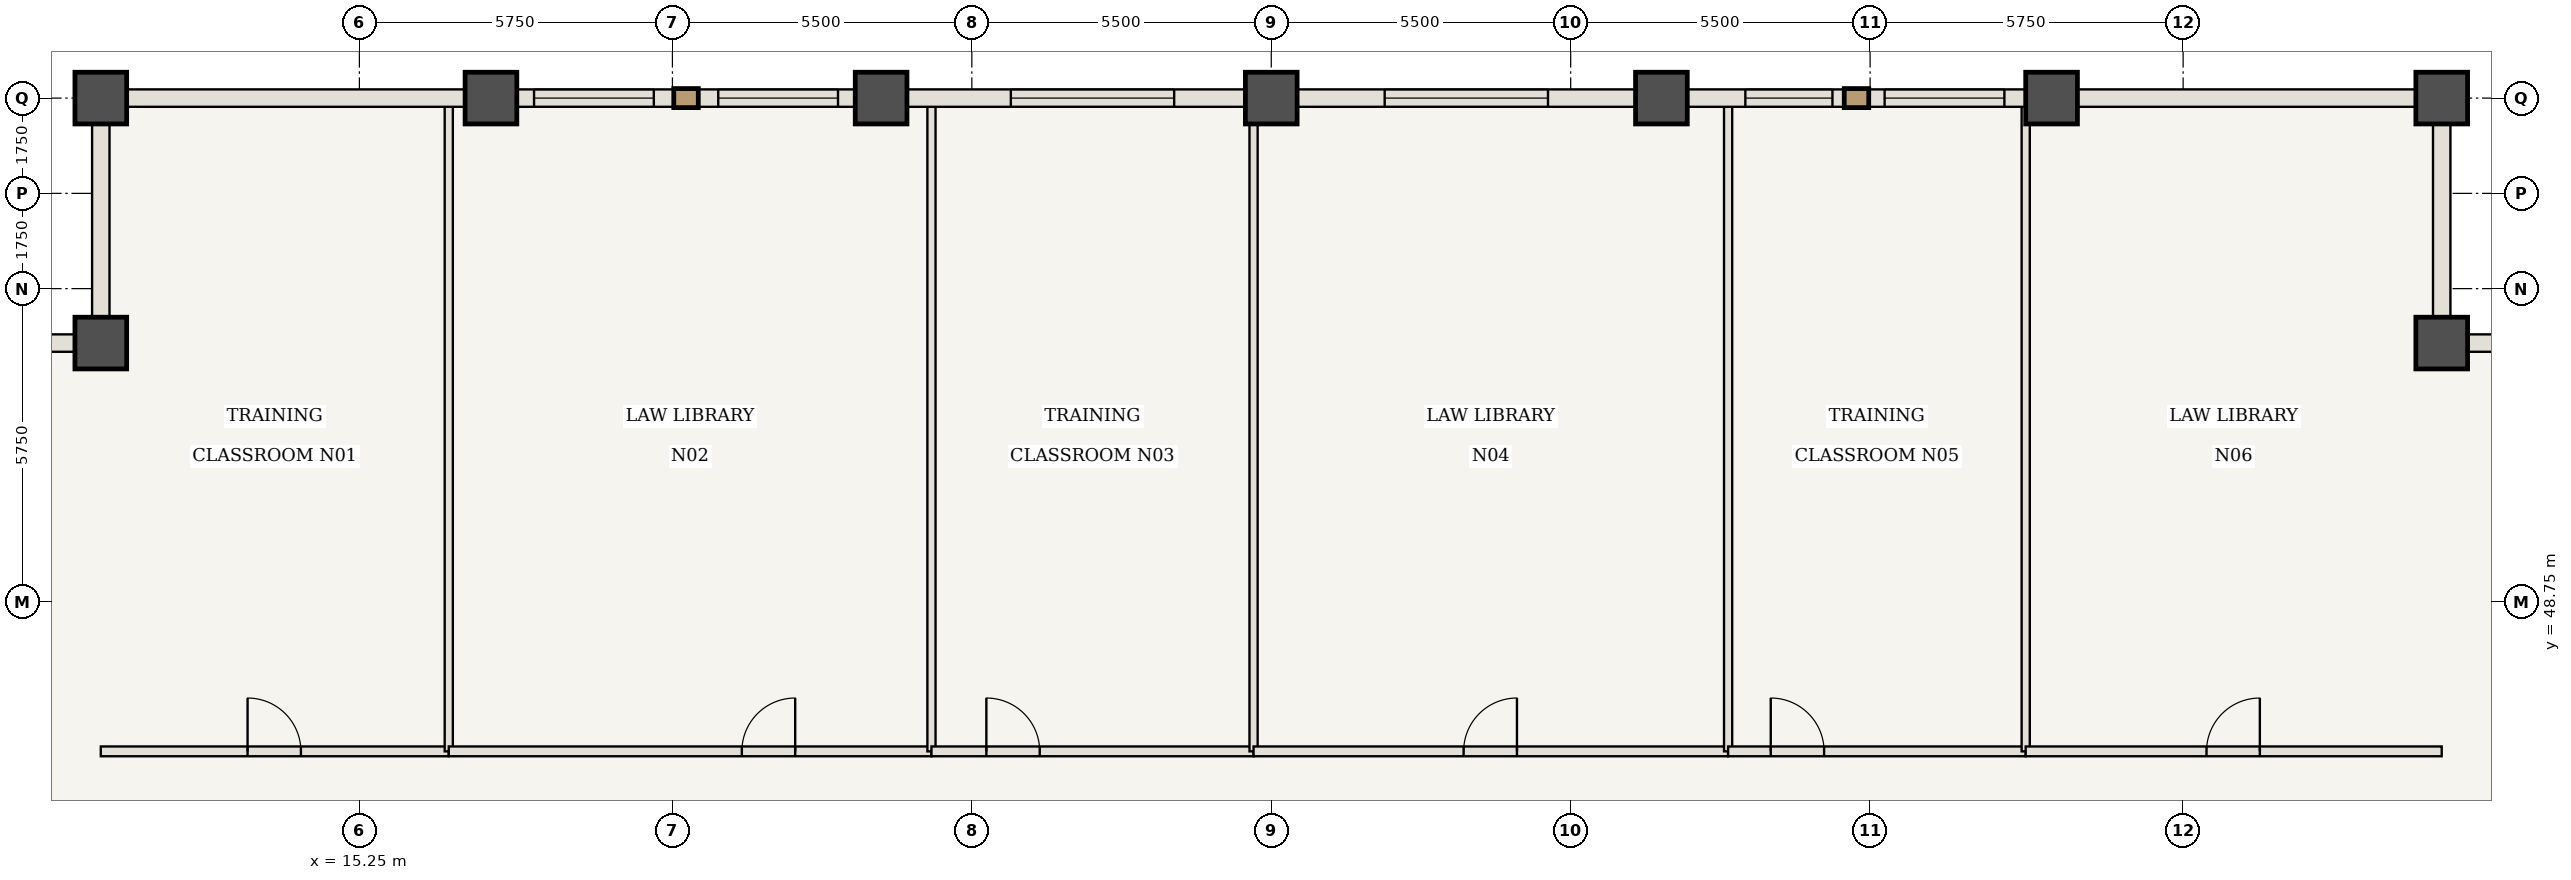
"""IFC4 building model, lengths in metres.
Left out: names, types, materials, properties, quantities, classifications, styles, units other than length and angle.
Written with IfcOpenShell. Run it as: python <this file> out.ifc"""

import sys

from ifc_helpers import new_model, si_unit, direction, frame, frame_2d, origin, origin_2d, place, context, subcontext, project, spatial, rectangle, extrude, element, fill, save


model = new_model("IFC4")
c1 = context("Model", 3, precision=1e-05, world=origin(), true_north=direction((0.0, 1.0)))
c2 = subcontext(c1, "Body", "Model", "MODEL_VIEW")
j1 = project(units=[si_unit("LENGTHUNIT", "METRE"), si_unit("PLANEANGLEUNIT", "RADIAN")], contexts=[c1])
p1 = place(None, origin())
s1 = spatial("IfcSite", under=j1, at=p1, CompositionType="ELEMENT")
p2 = place(p1, origin())
s2 = spatial("IfcBuilding", under=s1, at=p2, CompositionType="ELEMENT")
p3 = place(p2, frame((0.0, 0.0, 129.85)))
s3 = spatial("IfcBuildingStorey", under=s2, at=p3, CompositionType="ELEMENT", Elevation=129.85)
for number, where, z_axis, x_axis in (
    (1, (53.5, 53.5, 0.0), (0.0, 0.0, 1.0), (1.0, 0.0, 0.0)),
    (2, (53.5, 58.0, 0.0), (0.0, 0.0, 1.0), (1.0, 0.0, 0.0)),
    (3, (10.5, 58.0, 0.0), (0.0, 0.0, 1.0), (1.0, 0.0, 0.0)),
    (4, (10.5, 53.5, 0.0), (0.0, 0.0, 1.0), (1.0, 0.0, 0.0)),
    (5, (17.667, 58.0, 0.0), (0.0, 0.0, 1.0), (1.0, 0.0, 0.0)),
    (6, (24.833, 58.0, 0.0), (0.0, 0.0, 1.0), (1.0, 0.0, 0.0)),
    (7, (32.0, 58.0, 0.0), (0.0, 0.0, 1.0), (1.0, 0.0, 0.0)),
    (8, (39.167, 58.0, 0.0), (0.0, 0.0, 1.0), (1.0, 0.0, 0.0)),
    (9, (46.333, 58.0, 0.0), (0.0, 0.0, 1.0), (1.0, 0.0, 0.0)),
):
    element("IfcColumn", number, at=place(p3, frame(where, z_axis=z_axis, x_axis=x_axis)), inside=s3, PredefinedType="COLUMN", context=c2, shape_type="SweptSolid", body=[
        extrude(rectangle(XDim=0.95, YDim=0.95, at=origin_2d()), origin(), (0.0, 0.0, 1.0), 3.85),
    ])
p4 = place(p3, frame((10.5, 46.0, 0.0), z_axis=(0.0, 0.0, 1.0), x_axis=(1.0, 0.0, 0.0)))
e10 = element("IfcWall", 10, at=p4, inside=s3, PredefinedType="STANDARD", context=c2, shape_type="SweptSolid", body=[
    extrude(rectangle(XDim=6.392, YDim=0.18, at=frame_2d((3.196, 0.0))), origin(), (0.0, 0.0, 1.0), 3.685),
])
p5 = place(p4, frame((2.696, 0.0, 0.0)))
e11 = element("IfcOpeningElement", 11, at=p5, cuts=e10, PredefinedType="OPENING", context=c2, shape_type="SweptSolid", body=[
    extrude(rectangle(XDim=0.98, YDim=2.2, at=frame_2d((0.49, 1.1))), frame((0.0, 0.1, 0.0), z_axis=(0.0, -1.0, 0.0), x_axis=(1.0, 0.0, 0.0)), (0.0, 0.0, 1.0), 0.2),
])
p6 = place(p3, frame((16.892, 46.0, 0.0), z_axis=(0.0, 0.0, 1.0), x_axis=(0.0, 1.0, 0.0)))
e12 = element("IfcWall", 12, at=p6, inside=s3, PredefinedType="STANDARD", context=c2, shape_type="SweptSolid", body=[
    extrude(rectangle(XDim=11.94, YDim=0.15, at=frame_2d((5.97, 0.0))), origin(), (0.0, 0.0, 1.0), 3.685),
])
p7 = place(p3, frame((16.892, 46.0, 0.0), z_axis=(0.0, 0.0, 1.0), x_axis=(1.0, 0.0, 0.0)))
e13 = element("IfcWall", 13, at=p7, inside=s3, PredefinedType="STANDARD", context=c2, shape_type="SweptSolid", body=[
    extrude(rectangle(XDim=8.867, YDim=0.18, at=frame_2d((4.433, 0.0))), origin(), (0.0, 0.0, 1.0), 3.685),
])
p8 = place(p7, frame((5.383, 0.0, 0.0)))
e14 = element("IfcOpeningElement", 14, at=p8, cuts=e13, PredefinedType="OPENING", context=c2, shape_type="SweptSolid", body=[
    extrude(rectangle(XDim=0.98, YDim=2.2, at=frame_2d((0.49, 1.1))), frame((0.0, 0.1, 0.0), z_axis=(0.0, -1.0, 0.0), x_axis=(1.0, 0.0, 0.0)), (0.0, 0.0, 1.0), 0.2),
])
p9 = place(p3, frame((25.758, 46.0, 0.0), z_axis=(0.0, 0.0, 1.0), x_axis=(0.0, 1.0, 0.0)))
e15 = element("IfcWall", 15, at=p9, inside=s3, PredefinedType="STANDARD", context=c2, shape_type="SweptSolid", body=[
    extrude(rectangle(XDim=11.94, YDim=0.15, at=frame_2d((5.97, 0.0))), origin(), (0.0, 0.0, 1.0), 3.685),
])
p10 = place(p3, frame((25.758, 46.0, 0.0), z_axis=(0.0, 0.0, 1.0), x_axis=(1.0, 0.0, 0.0)))
e16 = element("IfcWall", 16, at=p10, inside=s3, PredefinedType="STANDARD", context=c2, shape_type="SweptSolid", body=[
    extrude(rectangle(XDim=5.917, YDim=0.18, at=frame_2d((2.958, 0.0))), origin(), (0.0, 0.0, 1.0), 3.685),
])
p11 = place(p10, frame((1.008, 0.0, 0.0)))
e17 = element("IfcOpeningElement", 17, at=p11, cuts=e16, PredefinedType="OPENING", context=c2, shape_type="SweptSolid", body=[
    extrude(rectangle(XDim=0.98, YDim=2.2, at=frame_2d((0.49, 1.1))), frame((0.0, 0.1, 0.0), z_axis=(0.0, -1.0, 0.0), x_axis=(1.0, 0.0, 0.0)), (0.0, 0.0, 1.0), 0.2),
])
p12 = place(p3, frame((31.675, 46.0, 0.0), z_axis=(0.0, 0.0, 1.0), x_axis=(0.0, 1.0, 0.0)))
e18 = element("IfcWall", 18, at=p12, inside=s3, PredefinedType="STANDARD", context=c2, shape_type="SweptSolid", body=[
    extrude(rectangle(XDim=11.94, YDim=0.15, at=frame_2d((5.97, 0.0))), origin(), (0.0, 0.0, 1.0), 3.685),
])
p13 = place(p3, frame((31.675, 46.0, 0.0), z_axis=(0.0, 0.0, 1.0), x_axis=(1.0, 0.0, 0.0)))
e19 = element("IfcWall", 19, at=p13, inside=s3, PredefinedType="STANDARD", context=c2, shape_type="SweptSolid", body=[
    extrude(rectangle(XDim=8.717, YDim=0.18, at=frame_2d((4.358, 0.0))), origin(), (0.0, 0.0, 1.0), 3.685),
])
p14 = place(p13, frame((3.858, 0.0, 0.0)))
e20 = element("IfcOpeningElement", 20, at=p14, cuts=e19, PredefinedType="OPENING", context=c2, shape_type="SweptSolid", body=[
    extrude(rectangle(XDim=0.98, YDim=2.2, at=frame_2d((0.49, 1.1))), frame((0.0, 0.1, 0.0), z_axis=(0.0, -1.0, 0.0), x_axis=(1.0, 0.0, 0.0)), (0.0, 0.0, 1.0), 0.2),
])
p15 = place(p3, frame((40.392, 46.0, 0.0), z_axis=(0.0, 0.0, 1.0), x_axis=(0.0, 1.0, 0.0)))
e21 = element("IfcWall", 21, at=p15, inside=s3, PredefinedType="STANDARD", context=c2, shape_type="SweptSolid", body=[
    extrude(rectangle(XDim=11.94, YDim=0.15, at=frame_2d((5.97, 0.0))), origin(), (0.0, 0.0, 1.0), 3.685),
])
p16 = place(p3, frame((40.392, 46.0, 0.0), z_axis=(0.0, 0.0, 1.0), x_axis=(1.0, 0.0, 0.0)))
e22 = element("IfcWall", 22, at=p16, inside=s3, PredefinedType="STANDARD", context=c2, shape_type="SweptSolid", body=[
    extrude(rectangle(XDim=5.467, YDim=0.18, at=frame_2d((2.733, 0.0))), origin(), (0.0, 0.0, 1.0), 3.685),
])
p17 = place(p16, frame((0.783, 0.0, 0.0)))
e23 = element("IfcOpeningElement", 23, at=p17, cuts=e22, PredefinedType="OPENING", context=c2, shape_type="SweptSolid", body=[
    extrude(rectangle(XDim=0.98, YDim=2.2, at=frame_2d((0.49, 1.1))), frame((0.0, 0.1, 0.0), z_axis=(0.0, -1.0, 0.0), x_axis=(1.0, 0.0, 0.0)), (0.0, 0.0, 1.0), 0.2),
])
p18 = place(p3, frame((45.858, 46.0, 0.0), z_axis=(0.0, 0.0, 1.0), x_axis=(0.0, 1.0, 0.0)))
e24 = element("IfcWall", 24, at=p18, inside=s3, PredefinedType="STANDARD", context=c2, shape_type="SweptSolid", body=[
    extrude(rectangle(XDim=11.94, YDim=0.15, at=frame_2d((5.97, 0.0))), origin(), (0.0, 0.0, 1.0), 3.685),
])
p19 = place(p3, frame((45.858, 46.0, 0.0), z_axis=(0.0, 0.0, 1.0), x_axis=(1.0, 0.0, 0.0)))
e25 = element("IfcWall", 25, at=p19, inside=s3, PredefinedType="STANDARD", context=c2, shape_type="SweptSolid", body=[
    extrude(rectangle(XDim=7.642, YDim=0.18, at=frame_2d((3.821, 0.0))), origin(), (0.0, 0.0, 1.0), 3.685),
])
p20 = place(p19, frame((3.321, 0.0, 0.0)))
e26 = element("IfcOpeningElement", 26, at=p20, cuts=e25, PredefinedType="OPENING", context=c2, shape_type="SweptSolid", body=[
    extrude(rectangle(XDim=0.98, YDim=2.2, at=frame_2d((0.49, 1.1))), frame((0.0, 0.1, 0.0), z_axis=(0.0, -1.0, 0.0), x_axis=(1.0, 0.0, 0.0)), (0.0, 0.0, 1.0), 0.2),
])
p21 = place(p3, frame((10.5, 58.0, 0.0), z_axis=(0.0, 0.0, 1.0), x_axis=(1.0, 0.0, 0.0)))
e27 = element("IfcWall", 27, at=p21, inside=s3, PredefinedType="USERDEFINED", context=c2, shape_type="SweptSolid", body=[
    extrude(rectangle(XDim=7.167, YDim=0.32, at=frame_2d((3.583, 0.0))), origin(), (0.0, 0.0, 1.0), 2.885),
])
p22 = place(p3, frame((17.667, 58.0, 0.0), z_axis=(0.0, 0.0, 1.0), x_axis=(1.0, 0.0, 0.0)))
e28 = element("IfcWall", 28, at=p22, inside=s3, PredefinedType="USERDEFINED", context=c2, shape_type="SweptSolid", body=[
    extrude(rectangle(XDim=7.167, YDim=0.32, at=frame_2d((3.583, 0.0))), origin(), (0.0, 0.0, 1.0), 2.885),
])
p23 = place(p22, frame((0.792, 0.0, 0.85)))
e29 = element("IfcOpeningElement", 29, at=p23, cuts=e28, PredefinedType="OPENING", context=c2, shape_type="SweptSolid", body=[
    extrude(rectangle(XDim=2.2, YDim=1.835, at=frame_2d((1.1, 0.917))), frame((0.0, 0.17, 0.0), z_axis=(0.0, -1.0, 0.0), x_axis=(1.0, 0.0, 0.0)), (0.0, 0.0, 1.0), 0.34),
])
p24 = place(p22, frame((4.175, 0.0, 0.85)))
e30 = element("IfcOpeningElement", 30, at=p24, cuts=e28, PredefinedType="OPENING", context=c2, shape_type="SweptSolid", body=[
    extrude(rectangle(XDim=2.2, YDim=1.835, at=frame_2d((1.1, 0.917))), frame((0.0, 0.17, 0.0), z_axis=(0.0, -1.0, 0.0), x_axis=(1.0, 0.0, 0.0)), (0.0, 0.0, 1.0), 0.34),
])
p25 = place(p3, frame((24.833, 58.0, 0.0), z_axis=(0.0, 0.0, 1.0), x_axis=(1.0, 0.0, 0.0)))
e31 = element("IfcWall", 31, at=p25, inside=s3, PredefinedType="USERDEFINED", context=c2, shape_type="SweptSolid", body=[
    extrude(rectangle(XDim=7.167, YDim=0.32, at=frame_2d((3.583, 0.0))), origin(), (0.0, 0.0, 1.0), 2.885),
])
p26 = place(p25, frame((2.383, 0.0, 0.85)))
e32 = element("IfcOpeningElement", 32, at=p26, cuts=e31, PredefinedType="OPENING", context=c2, shape_type="SweptSolid", body=[
    extrude(rectangle(XDim=3.0, YDim=1.835, at=frame_2d((1.5, 0.917))), frame((0.0, 0.17, 0.0), z_axis=(0.0, -1.0, 0.0), x_axis=(1.0, 0.0, 0.0)), (0.0, 0.0, 1.0), 0.34),
])
p27 = place(p3, frame((32.0, 58.0, 0.0), z_axis=(0.0, 0.0, 1.0), x_axis=(1.0, 0.0, 0.0)))
e33 = element("IfcWall", 33, at=p27, inside=s3, PredefinedType="USERDEFINED", context=c2, shape_type="SweptSolid", body=[
    extrude(rectangle(XDim=7.167, YDim=0.32, at=frame_2d((3.583, 0.0))), origin(), (0.0, 0.0, 1.0), 2.885),
])
p28 = place(p27, frame((2.083, 0.0, 0.85)))
e34 = element("IfcOpeningElement", 34, at=p28, cuts=e33, PredefinedType="OPENING", context=c2, shape_type="SweptSolid", body=[
    extrude(rectangle(XDim=3.0, YDim=1.835, at=frame_2d((1.5, 0.917))), frame((0.0, 0.17, 0.0), z_axis=(0.0, -1.0, 0.0), x_axis=(1.0, 0.0, 0.0)), (0.0, 0.0, 1.0), 0.34),
])
p29 = place(p3, frame((39.167, 58.0, 0.0), z_axis=(0.0, 0.0, 1.0), x_axis=(1.0, 0.0, 0.0)))
e35 = element("IfcWall", 35, at=p29, inside=s3, PredefinedType="USERDEFINED", context=c2, shape_type="SweptSolid", body=[
    extrude(rectangle(XDim=7.167, YDim=0.32, at=frame_2d((3.583, 0.0))), origin(), (0.0, 0.0, 1.0), 2.885),
])
p30 = place(p29, frame((1.542, 0.0, 0.85)))
e36 = element("IfcOpeningElement", 36, at=p30, cuts=e35, PredefinedType="OPENING", context=c2, shape_type="SweptSolid", body=[
    extrude(rectangle(XDim=1.6, YDim=1.835, at=frame_2d((0.8, 0.917))), frame((0.0, 0.17, 0.0), z_axis=(0.0, -1.0, 0.0), x_axis=(1.0, 0.0, 0.0)), (0.0, 0.0, 1.0), 0.34),
])
p31 = place(p29, frame((4.1, 0.0, 0.85)))
e37 = element("IfcOpeningElement", 37, at=p31, cuts=e35, PredefinedType="OPENING", context=c2, shape_type="SweptSolid", body=[
    extrude(rectangle(XDim=2.2, YDim=1.835, at=frame_2d((1.1, 0.917))), frame((0.0, 0.17, 0.0), z_axis=(0.0, -1.0, 0.0), x_axis=(1.0, 0.0, 0.0)), (0.0, 0.0, 1.0), 0.34),
])
p32 = place(p3, frame((46.333, 58.0, 0.0), z_axis=(0.0, 0.0, 1.0), x_axis=(1.0, 0.0, 0.0)))
e38 = element("IfcWall", 38, at=p32, inside=s3, PredefinedType="USERDEFINED", context=c2, shape_type="SweptSolid", body=[
    extrude(rectangle(XDim=7.167, YDim=0.32, at=frame_2d((3.583, 0.0))), origin(), (0.0, 0.0, 1.0), 2.885),
])
for number, where, z_axis, x_axis in (
    (39, (53.5, 53.5, 0.0), (0.0, 0.0, 1.0), (1.0, 0.0, 0.0)),
    (40, (53.5, 58.0, 0.0), (0.0, 0.0, 1.0), (0.0, -1.0, 0.0)),
    (41, (10.5, 53.5, 0.0), (0.0, 0.0, 1.0), (0.0, 1.0, 0.0)),
    (42, (6.0, 53.5, 0.0), (0.0, 0.0, 1.0), (1.0, 0.0, 0.0)),
):
    element("IfcWall", number, at=place(p3, frame(where, z_axis=z_axis, x_axis=x_axis)), inside=s3, PredefinedType="USERDEFINED", context=c2, shape_type="SweptSolid", body=[
        extrude(rectangle(XDim=4.5, YDim=0.32, at=frame_2d((2.25, 0.0))), origin(), (0.0, 0.0, 1.0), 2.885),
    ])
p33 = place(p5, origin())
e43 = element("IfcDoor", 43, at=p33, inside=s3, OperationType="SINGLE_SWING_LEFT", PredefinedType="DOOR", context=c2, shape_type="SweptSolid", body=[
    extrude(rectangle(XDim=0.98, YDim=2.2, at=frame_2d((0.49, 1.1))), frame((0.0, 0.025, 0.0), z_axis=(0.0, -1.0, 0.0), x_axis=(1.0, 0.0, 0.0)), (0.0, 0.0, 1.0), 0.05),
])
fill(e11, e43)
p34 = place(p8, origin())
e44 = element("IfcDoor", 44, at=p34, inside=s3, OperationType="SINGLE_SWING_RIGHT", PredefinedType="DOOR", context=c2, shape_type="SweptSolid", body=[
    extrude(rectangle(XDim=0.98, YDim=2.2, at=frame_2d((0.49, 1.1))), frame((0.0, 0.025, 0.0), z_axis=(0.0, -1.0, 0.0), x_axis=(1.0, 0.0, 0.0)), (0.0, 0.0, 1.0), 0.05),
])
fill(e14, e44)
p35 = place(p11, origin())
e45 = element("IfcDoor", 45, at=p35, inside=s3, OperationType="SINGLE_SWING_LEFT", PredefinedType="DOOR", context=c2, shape_type="SweptSolid", body=[
    extrude(rectangle(XDim=0.98, YDim=2.2, at=frame_2d((0.49, 1.1))), frame((0.0, 0.025, 0.0), z_axis=(0.0, -1.0, 0.0), x_axis=(1.0, 0.0, 0.0)), (0.0, 0.0, 1.0), 0.05),
])
fill(e17, e45)
p36 = place(p14, origin())
e46 = element("IfcDoor", 46, at=p36, inside=s3, OperationType="SINGLE_SWING_RIGHT", PredefinedType="DOOR", context=c2, shape_type="SweptSolid", body=[
    extrude(rectangle(XDim=0.98, YDim=2.2, at=frame_2d((0.49, 1.1))), frame((0.0, 0.025, 0.0), z_axis=(0.0, -1.0, 0.0), x_axis=(1.0, 0.0, 0.0)), (0.0, 0.0, 1.0), 0.05),
])
fill(e20, e46)
p37 = place(p17, origin())
e47 = element("IfcDoor", 47, at=p37, inside=s3, OperationType="SINGLE_SWING_LEFT", PredefinedType="DOOR", context=c2, shape_type="SweptSolid", body=[
    extrude(rectangle(XDim=0.98, YDim=2.2, at=frame_2d((0.49, 1.1))), frame((0.0, 0.025, 0.0), z_axis=(0.0, -1.0, 0.0), x_axis=(1.0, 0.0, 0.0)), (0.0, 0.0, 1.0), 0.05),
])
fill(e23, e47)
p38 = place(p20, origin())
e48 = element("IfcDoor", 48, at=p38, inside=s3, OperationType="SINGLE_SWING_RIGHT", PredefinedType="DOOR", context=c2, shape_type="SweptSolid", body=[
    extrude(rectangle(XDim=0.98, YDim=2.2, at=frame_2d((0.49, 1.1))), frame((0.0, 0.025, 0.0), z_axis=(0.0, -1.0, 0.0), x_axis=(1.0, 0.0, 0.0)), (0.0, 0.0, 1.0), 0.05),
])
fill(e26, e48)
p39 = place(p23, origin())
e49 = element("IfcWindow", 49, at=p39, inside=s3, PartitioningType="SINGLE_PANEL", PredefinedType="WINDOW", context=c2, shape_type="SweptSolid", body=[
    extrude(rectangle(XDim=2.2, YDim=1.835, at=frame_2d((1.1, 0.917))), frame((0.0, 0.03, 0.0), z_axis=(0.0, -1.0, 0.0), x_axis=(1.0, 0.0, 0.0)), (0.0, 0.0, 1.0), 0.06),
])
fill(e29, e49)
p40 = place(p24, origin())
e50 = element("IfcWindow", 50, at=p40, inside=s3, PartitioningType="SINGLE_PANEL", PredefinedType="WINDOW", context=c2, shape_type="SweptSolid", body=[
    extrude(rectangle(XDim=2.2, YDim=1.835, at=frame_2d((1.1, 0.917))), frame((0.0, 0.03, 0.0), z_axis=(0.0, -1.0, 0.0), x_axis=(1.0, 0.0, 0.0)), (0.0, 0.0, 1.0), 0.06),
])
fill(e30, e50)
p41 = place(p26, origin())
e51 = element("IfcWindow", 51, at=p41, inside=s3, PartitioningType="SINGLE_PANEL", PredefinedType="WINDOW", context=c2, shape_type="SweptSolid", body=[
    extrude(rectangle(XDim=3.0, YDim=1.835, at=frame_2d((1.5, 0.917))), frame((0.0, 0.03, 0.0), z_axis=(0.0, -1.0, 0.0), x_axis=(1.0, 0.0, 0.0)), (0.0, 0.0, 1.0), 0.06),
])
fill(e32, e51)
p42 = place(p28, origin())
e52 = element("IfcWindow", 52, at=p42, inside=s3, PartitioningType="SINGLE_PANEL", PredefinedType="WINDOW", context=c2, shape_type="SweptSolid", body=[
    extrude(rectangle(XDim=3.0, YDim=1.835, at=frame_2d((1.5, 0.917))), frame((0.0, 0.03, 0.0), z_axis=(0.0, -1.0, 0.0), x_axis=(1.0, 0.0, 0.0)), (0.0, 0.0, 1.0), 0.06),
])
fill(e34, e52)
p43 = place(p30, origin())
e53 = element("IfcWindow", 53, at=p43, inside=s3, PartitioningType="SINGLE_PANEL", PredefinedType="WINDOW", context=c2, shape_type="SweptSolid", body=[
    extrude(rectangle(XDim=1.6, YDim=1.835, at=frame_2d((0.8, 0.917))), frame((0.0, 0.03, 0.0), z_axis=(0.0, -1.0, 0.0), x_axis=(1.0, 0.0, 0.0)), (0.0, 0.0, 1.0), 0.06),
])
fill(e36, e53)
p44 = place(p31, origin())
e54 = element("IfcWindow", 54, at=p44, inside=s3, PartitioningType="SINGLE_PANEL", PredefinedType="WINDOW", context=c2, shape_type="SweptSolid", body=[
    extrude(rectangle(XDim=2.2, YDim=1.835, at=frame_2d((1.1, 0.917))), frame((0.0, 0.03, 0.0), z_axis=(0.0, -1.0, 0.0), x_axis=(1.0, 0.0, 0.0)), (0.0, 0.0, 1.0), 0.06),
])
fill(e37, e54)
save(model, sys.argv[1])
